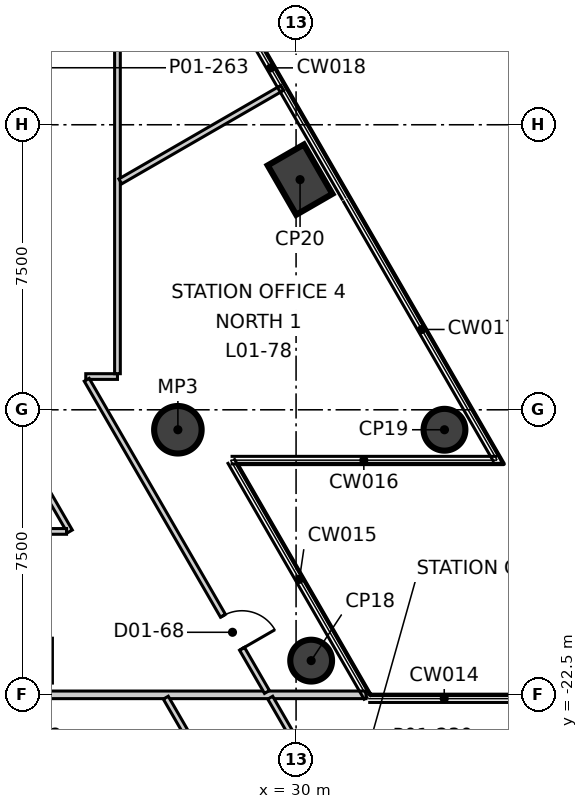
"""IFC4 building model, lengths in metres.
Left out: names, types, materials, properties, quantities, classifications, styles, units other than length and angle.
Written with IfcOpenShell. Run it as: python <this file> out.ifc"""

import sys

from ifc_helpers import new_model, si_unit, direction, frame, frame_2d, origin, origin_2d, place, context, subcontext, project, spatial, rectangle, circle, extrude, element, fill, save


model = new_model("IFC4")
c1 = context("Model", 3, precision=1e-05, world=origin(), true_north=direction((0.0, 1.0)))
c2 = subcontext(c1, "Body", "Model", "MODEL_VIEW")
j1 = project(units=[si_unit("LENGTHUNIT", "METRE"), si_unit("PLANEANGLEUNIT", "RADIAN")], contexts=[c1])
p1 = place(None, origin())
s1 = spatial("IfcSite", under=j1, at=p1, CompositionType="ELEMENT")
p2 = place(p1, origin())
s2 = spatial("IfcBuilding", under=s1, at=p2, CompositionType="ELEMENT")
p3 = place(p2, frame((0.0, 0.0, 8.5)))
s3 = spatial("IfcBuildingStorey", under=s2, at=p3, CompositionType="ELEMENT", Elevation=8.5)
for number, where, z_axis, x_axis in (
    (1, (30.397, -21.6, -0.4), (0.0, 0.0, 1.0), (1.0, 0.0, 0.0)),
    (2, (33.905, -15.525, -0.4), (0.0, 0.0, 1.0), (-0.5, 0.866, 0.0)),
):
    element("IfcColumn", number, at=place(p3, frame(where, z_axis=z_axis, x_axis=x_axis)), inside=s3, PredefinedType="COLUMN", context=c2, shape_type="SweptSolid", body=[
        extrude(circle(Radius=0.55, at=origin_2d()), origin(), (0.0, 0.0, 1.0), 6.0),
    ])
p4 = place(p3, frame((30.105, -8.944, -0.4), z_axis=(0.0, 0.0, 1.0), x_axis=(-0.5, 0.866025403784, 0.0)))
e3 = element("IfcColumn", 3, at=p4, inside=s3, PredefinedType="COLUMN", context=c2, shape_type="SweptSolid", body=[
    extrude(rectangle(XDim=1.5, YDim=1.1, at=origin_2d()), origin(), (0.0, 0.0, 1.0), 6.0),
])
p5 = place(p3, frame((26.89, -15.525, -0.4), z_axis=(0.0, 0.0, 1.0), x_axis=(1.0, 0.0, 0.0)))
e4 = element("IfcColumn", 4, at=p5, inside=s3, PredefinedType="COLUMN", context=c2, shape_type="SweptSolid", body=[
    extrude(circle(Radius=0.625, at=origin_2d()), origin(), (0.0, 0.0, 1.0), 6.0),
])
p6 = place(p3, frame((20.575, -22.5, 0.0), z_axis=(0.0, 0.0, 1.0), x_axis=(1.0, 0.0, 0.0)))
e5 = element("IfcWall", 5, at=p6, inside=s3, PredefinedType="SOLIDWALL", context=c2, shape_type="SweptSolid", body=[
    extrude(rectangle(XDim=11.266, YDim=0.2, at=frame_2d((5.633, 0.0))), origin(), (0.0, 0.0, 1.0), 5.6),
])
p7 = place(p3, frame((24.466, -14.125, 0.0), z_axis=(0.0, 0.0, 1.0), x_axis=(1.0, 0.0, 0.0)))
e6 = element("IfcWall", 6, at=p7, inside=s3, PredefinedType="PARTITIONING", context=c2, shape_type="SweptSolid", body=[
    extrude(rectangle(XDim=0.834, YDim=0.15, at=frame_2d((0.417, 0.0))), origin(), (0.0, 0.0, 1.0), 5.6),
])
p8 = place(p3, frame((22.243, -15.075, 0.0), z_axis=(0.0, 0.0, 1.0), x_axis=(0.499995765644, -0.866027848477, 0.0)))
e7 = element("IfcWall", 7, at=p8, inside=s3, PredefinedType="PARTITIONING", context=c2, shape_type="SweptSolid", body=[
    extrude(rectangle(XDim=3.608, YDim=0.15, at=frame_2d((1.804, 0.0))), origin(), (0.0, 0.0, 1.0), 5.6),
])
p9 = place(p3, frame((26.572, -22.575, 0.0), z_axis=(0.0, 0.0, 1.0), x_axis=(0.499981047344, -0.866036345829, 0.0)))
e8 = element("IfcWall", 8, at=p9, inside=s3, PredefinedType="PARTITIONING", context=c2, shape_type="SweptSolid", body=[
    extrude(rectangle(XDim=3.868, YDim=0.15, at=frame_2d((1.934, 0.0))), origin(), (0.0, 0.0, 1.0), 5.6),
])
p10 = place(p3, frame((17.575, -18.2, 0.0), z_axis=(0.0, 0.0, 1.0), x_axis=(1.0, 0.0, 0.0)))
e9 = element("IfcWall", 9, at=p10, inside=s3, PredefinedType="PARTITIONING", context=c2, shape_type="SweptSolid", body=[
    extrude(rectangle(XDim=6.385, YDim=0.15, at=frame_2d((3.192, 0.0))), origin(), (0.0, 0.0, 1.0), 5.6),
])
p11 = place(p3, frame((25.3, -14.05, 0.0), z_axis=(0.0, 0.0, 1.0), x_axis=(0.0, 1.0, 0.0)))
e10 = element("IfcWall", 10, at=p11, inside=s3, PredefinedType="PARTITIONING", context=c2, shape_type="SweptSolid", body=[
    extrude(rectangle(XDim=11.975, YDim=0.15, at=frame_2d((5.988, 0.0))), origin(), (0.0, 0.0, 1.0), 5.6),
])
p12 = place(p3, frame((25.375, -8.99, 0.0), z_axis=(0.0, 0.0, 1.0), x_axis=(0.865986393087, 0.500067562424, 0.0)))
e11 = element("IfcWall", 11, at=p12, inside=s3, PredefinedType="PARTITIONING", context=c2, shape_type="SweptSolid", body=[
    extrude(rectangle(XDim=4.919, YDim=0.15, at=frame_2d((2.459, 0.0))), origin(), (0.0, 0.0, 1.0), 5.6),
])
p13 = place(p3, frame((24.491, -14.21, 0.0), z_axis=(0.0, 0.0, 1.0), x_axis=(0.499994996542, -0.866028292513, 0.0)))
e12 = element("IfcWall", 12, at=p13, inside=s3, PredefinedType="PARTITIONING", context=c2, shape_type="SweptSolid", body=[
    extrude(rectangle(XDim=9.486, YDim=0.15, at=frame_2d((4.743, 0.0))), origin(), (0.0, 0.0, 1.0), 5.6),
])
p14 = place(p13, frame((7.172, 0.0, 0.0)))
e13 = element("IfcOpeningElement", 13, at=p14, cuts=e12, PredefinedType="OPENING", context=c2, shape_type="SweptSolid", body=[
    extrude(rectangle(XDim=1.0, YDim=2.1, at=frame_2d((0.5, 1.05))), frame((0.0, 0.085, 0.0), z_axis=(0.0, -1.0, 0.0), x_axis=(1.0, 0.0, 0.0)), (0.0, 0.0, 1.0), 0.17),
])
p15 = place(p3, frame((29.32, -22.575, 0.0), z_axis=(0.0, 0.0, 1.0), x_axis=(0.499961819171, -0.866047446374, 0.0)))
e14 = element("IfcWall", 14, at=p15, inside=s3, PredefinedType="PARTITIONING", context=c2, shape_type="SweptSolid", body=[
    extrude(rectangle(XDim=3.62, YDim=0.15, at=frame_2d((1.81, 0.0))), origin(), (0.0, 0.0, 1.0), 5.6),
])
p16 = place(p14, origin())
e15 = element("IfcDoor", 15, at=p16, inside=s3, OperationType="SINGLE_SWING_LEFT", PredefinedType="DOOR", context=c2, shape_type="SweptSolid", body=[
    extrude(rectangle(XDim=1.0, YDim=2.1, at=frame_2d((0.5, 1.05))), frame((0.0, 0.025, 0.0), z_axis=(0.0, -1.0, 0.0), x_axis=(1.0, 0.0, 0.0)), (0.0, 0.0, 1.0), 0.05),
])
fill(e13, e15)
save(model, sys.argv[1])
